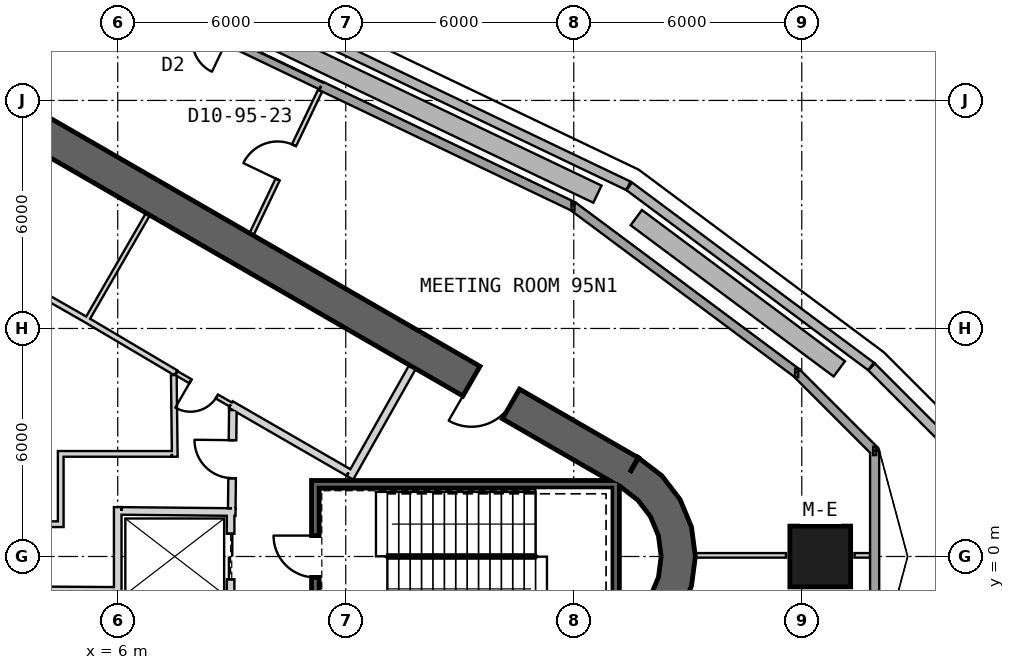
"""IFC4 building model, lengths in metres.
Left out: names, types, materials, properties, quantities, classifications, styles, units other than length and angle.
Written with IfcOpenShell. Run it as: python <this file> out.ifc"""

import sys

from ifc_helpers import new_model, si_unit, direction, frame, frame_2d, origin, origin_2d, place, context, subcontext, project, spatial, polyline, rectangle, outline, extrude, element, fill, save


model = new_model("IFC4")
c1 = context("Model", 3, precision=1e-05, world=origin(), true_north=direction((0.0, 1.0)))
c2 = subcontext(c1, "Body", "Model", "MODEL_VIEW")
j1 = project(units=[si_unit("LENGTHUNIT", "METRE"), si_unit("PLANEANGLEUNIT", "RADIAN")], contexts=[c1])
p1 = place(None, origin())
s1 = spatial("IfcSite", under=j1, at=p1, CompositionType="ELEMENT")
p2 = place(p1, origin())
s2 = spatial("IfcBuilding", under=s1, at=p2, CompositionType="ELEMENT")
p3 = place(p2, frame((0.0, 0.0, 420.3)))
s3 = spatial("IfcBuildingStorey", under=s2, at=p3, CompositionType="ELEMENT", Elevation=420.3)
p4 = place(p3, frame((24.486, 0.0, -0.25), z_axis=(0.0, 0.0, 1.0), x_axis=(1.0, 0.0, 0.0)))
e1 = element("IfcColumn", 1, at=p4, inside=s3, PredefinedType="COLUMN", context=c2, shape_type="SweptSolid", body=[
    extrude(rectangle(XDim=1.6, YDim=1.6, at=origin_2d()), origin(), (0.0, 0.0, 1.0), 5.0),
])
p5 = place(p3, frame((19.475, 2.208, 0.0), z_axis=(0.0, 0.0, 1.0), x_axis=(-0.866028369851, 0.499994862586, 0.0)))
e2 = element("IfcWall", 2, at=p5, inside=s3, PredefinedType="SHEAR", context=c2, shape_type="SweptSolid", body=[
    extrude(rectangle(XDim=31.523, YDim=0.9, at=frame_2d((15.762, 0.0))), origin(), (0.0, 0.0, 1.0), 5.0),
])
p6 = place(p5, frame((3.612, 0.0, 0.0)))
e3 = element("IfcOpeningElement", 3, at=p6, cuts=e2, PredefinedType="OPENING", context=c2, shape_type="SweptSolid", body=[
    extrude(rectangle(XDim=1.2, YDim=2.4, at=frame_2d((0.6, 1.2))), frame((0.0, 0.46, 0.0), z_axis=(0.0, -1.0, 0.0), x_axis=(1.0, 0.0, 0.0)), (0.0, 0.0, 1.0), 0.92),
])
p7 = place(p5, frame((26.712, 0.0, 0.0)))
e4 = element("IfcOpeningElement", 4, at=p7, cuts=e2, PredefinedType="OPENING", context=c2, shape_type="SweptSolid", body=[
    extrude(rectangle(XDim=1.2, YDim=2.4, at=frame_2d((0.6, 1.2))), frame((0.0, 0.46, 0.0), z_axis=(0.0, -1.0, 0.0), x_axis=(1.0, 0.0, 0.0)), (0.0, 0.0, 1.0), 0.92),
])
p8 = place(p3, origin())
e5 = element("IfcWall", 5, at=p8, inside=s3, PredefinedType="SHEAR", context=c2, shape_type="SweptSolid", body=[
    extrude(outline(polyline([(19.7, -2.598), (20.321, -2.121), (20.798, -1.5), (21.098, -0.777), (21.2, 0.0), (21.098, 0.777), (20.798, 1.5), (20.321, 2.121), (19.7, 2.598), (19.25, 1.819), (19.685, 1.485), (20.019, 1.05), (20.229, 0.543), (20.3, 0.0), (20.229, -0.543), (20.019, -1.05), (19.685, -1.485), (19.25, -1.819), (19.7, -2.598)])), origin(), (0.0, 0.0, 1.0), 5.0),
])
p9 = place(p3, frame((23.866, 4.83, 0.0), z_axis=(0.0, 0.0, 1.0), x_axis=(-0.801975305826, 0.597357186987, 0.0)))
e6 = element("IfcWall", 6, at=p9, inside=s3, PredefinedType="SOLIDWALL", context=c2, shape_type="SweptSolid", body=[
    extrude(rectangle(XDim=7.34, YDim=0.24, at=frame_2d((3.67, 0.0))), origin(), (0.0, 0.0, 1.0), 4.75),
])
p10 = place(p3, frame((17.98, 9.214, 0.0), z_axis=(0.0, 0.0, 1.0), x_axis=(-0.90231860982, 0.431069746528, 0.0)))
e7 = element("IfcWall", 7, at=p10, inside=s3, PredefinedType="SOLIDWALL", context=c2, shape_type="SweptSolid", body=[
    extrude(rectangle(XDim=7.346, YDim=0.24, at=frame_2d((3.673, 0.0))), origin(), (0.0, 0.0, 1.0), 4.75),
])
p11 = place(p3, frame((25.917, -2.779, 0.0), z_axis=(0.0, 0.0, 1.0), x_axis=(0.0, 1.0, 0.0)))
e8 = element("IfcWall", 8, at=p11, inside=s3, PredefinedType="SOLIDWALL", context=c2, shape_type="SweptSolid", body=[
    extrude(rectangle(XDim=5.558, YDim=0.24, at=frame_2d((2.779, 0.0))), origin(), (0.0, 0.0, 1.0), 4.75),
])
p12 = place(p3, frame((25.917, 2.779, 0.0), z_axis=(0.0, 0.0, 1.0), x_axis=(-0.707106781187, 0.707106781187, 0.0)))
e9 = element("IfcWall", 9, at=p12, inside=s3, PredefinedType="SOLIDWALL", context=c2, shape_type="SweptSolid", body=[
    extrude(rectangle(XDim=2.9, YDim=0.24, at=frame_2d((1.45, 0.0))), origin(), (0.0, 0.0, 1.0), 4.75),
])
p13 = place(p3, frame((11.351, 12.381, 0.0), z_axis=(0.0, 0.0, 1.0), x_axis=(-0.902328654497, 0.431048720301, 0.0)))
e10 = element("IfcWall", 10, at=p13, inside=s3, PredefinedType="SOLIDWALL", context=c2, shape_type="SweptSolid", body=[
    extrude(rectangle(XDim=7.306, YDim=0.2, at=frame_2d((3.653, 0.0))), origin(), (0.0, 0.0, 1.0), 4.75),
])
p14 = place(p13, frame((2.753, 0.0, 0.0)))
e11 = element("IfcOpeningElement", 11, at=p14, cuts=e10, PredefinedType="OPENING", context=c2, shape_type="SweptSolid", body=[
    extrude(rectangle(XDim=1.8, YDim=2.4, at=frame_2d((0.9, 1.2))), frame((0.0, 0.11, 0.0), z_axis=(0.0, -1.0, 0.0), x_axis=(1.0, 0.0, 0.0)), (0.0, 0.0, 1.0), 0.22),
])
p15 = place(p3, frame((25.836, 4.99, 0.04), z_axis=(0.0, 0.0, 1.0), x_axis=(0.707106781187, -0.707106781187, 0.0)))
e12 = element("IfcWall", 12, at=p15, inside=s3, PredefinedType="PARAPET", context=c2, shape_type="SweptSolid", body=[
    extrude(rectangle(XDim=3.0, YDim=0.25, at=frame_2d((1.5, 0.0))), origin(), (0.0, 0.0, 1.0), 1.2),
])
p16 = place(p3, frame((-2.224, 20.102, 0.04), z_axis=(0.0, 0.0, 1.0), x_axis=(0.902316737592, -0.43107366547, 0.0)))
e13 = element("IfcWall", 13, at=p16, inside=s3, PredefinedType="PARAPET", context=c2, shape_type="SweptSolid", body=[
    extrude(rectangle(XDim=24.007, YDim=0.25, at=frame_2d((12.004, 0.0))), origin(), (0.0, 0.0, 1.0), 1.2),
])
p17 = place(p3, frame((19.459, 9.741, 0.04), z_axis=(0.0, 0.0, 1.0), x_axis=(0.801989479124, -0.597338158311, 0.0)))
e14 = element("IfcWall", 14, at=p17, inside=s3, PredefinedType="PARAPET", context=c2, shape_type="SweptSolid", body=[
    extrude(rectangle(XDim=7.934, YDim=0.25, at=frame_2d((3.967, 0.0))), origin(), (0.0, 0.0, 1.0), 1.2),
])
p18 = place(p3, frame((-1.979, 19.376, 0.04), z_axis=(0.0, 0.0, 1.0), x_axis=(0.902317634008, -0.431071789101, 0.0)))
e15 = element("IfcWall", 15, at=p18, inside=s3, PredefinedType="PARAPET", context=c2, shape_type="SweptSolid", body=[
    extrude(rectangle(XDim=22.832, YDim=0.5, at=frame_2d((11.416, 0.0))), origin(), (0.0, 0.0, 1.0), 0.6),
])
p19 = place(p3, frame((19.645, 8.917, 0.04), z_axis=(0.0, 0.0, 1.0), x_axis=(0.801983344153, -0.597346395069, 0.0)))
e16 = element("IfcWall", 16, at=p19, inside=s3, PredefinedType="PARAPET", context=c2, shape_type="SweptSolid", body=[
    extrude(rectangle(XDim=6.662, YDim=0.5, at=frame_2d((3.331, 0.0))), origin(), (0.0, 0.0, 1.0), 0.6),
])
p20 = place(p3, frame((19.2, 1.9, -0.25), z_axis=(0.0, 0.0, 1.0), x_axis=(-1.0, 0.0, 0.0)))
e17 = element("IfcWall", 17, at=p20, inside=s3, PredefinedType="SHEAR", context=c2, shape_type="SweptSolid", body=[
    extrude(rectangle(XDim=8.1, YDim=0.2, at=frame_2d((4.05, 0.0))), origin(), (0.0, 0.0, 1.0), 5.0),
])
p21 = place(p3, frame((19.1, -2.0, -0.25), z_axis=(0.0, 0.0, 1.0), x_axis=(0.0, 1.0, 0.0)))
e18 = element("IfcWall", 18, at=p21, inside=s3, PredefinedType="SHEAR", context=c2, shape_type="SweptSolid", body=[
    extrude(rectangle(XDim=3.8, YDim=0.2, at=frame_2d((1.9, 0.0))), origin(), (0.0, 0.0, 1.0), 5.0),
])
p22 = place(p3, frame((11.2, -1.8, -0.25), z_axis=(0.0, 0.0, 1.0), x_axis=(0.0, 1.0, 0.0)))
e19 = element("IfcWall", 19, at=p22, inside=s3, PredefinedType="SHEAR", context=c2, shape_type="SweptSolid", body=[
    extrude(rectangle(XDim=3.6, YDim=0.2, at=frame_2d((1.8, 0.0))), origin(), (0.0, 0.0, 1.0), 5.0),
])
p23 = place(p22, frame((1.25, 0.0, 0.25)))
e20 = element("IfcOpeningElement", 20, at=p23, cuts=e19, PredefinedType="OPENING", context=c2, shape_type="SweptSolid", body=[
    extrude(rectangle(XDim=1.1, YDim=2.1, at=frame_2d((0.55, 1.05))), frame((0.0, 0.11, 0.0), z_axis=(0.0, -1.0, 0.0), x_axis=(1.0, 0.0, 0.0)), (0.0, 0.0, 1.0), 0.22),
])
p24 = place(p3, frame((8.97, 1.2, 0.0), z_axis=(0.0, 0.0, 1.0), x_axis=(0.0, -1.0, 0.0)))
e21 = element("IfcWall", 21, at=p24, inside=s3, PredefinedType="PLUMBINGWALL", context=c2, shape_type="SweptSolid", body=[
    extrude(rectangle(XDim=2.4, YDim=0.2, at=frame_2d((1.2, 0.0))), origin(), (0.0, 0.0, 1.0), 4.75),
])
p25 = place(p24, frame((0.6, 0.0, 0.0)))
e22 = element("IfcOpeningElement", 22, at=p25, cuts=e21, PredefinedType="OPENING", context=c2, shape_type="SweptSolid", body=[
    extrude(rectangle(XDim=1.2, YDim=2.4, at=frame_2d((0.6, 1.2))), frame((0.0, 0.11, 0.0), z_axis=(0.0, -1.0, 0.0), x_axis=(1.0, 0.0, 0.0)), (0.0, 0.0, 1.0), 0.22),
])
p26 = place(p3, frame((6.0, -1.1, 0.0), z_axis=(0.0, 0.0, 1.0), x_axis=(0.0, 1.0, 0.0)))
e23 = element("IfcWall", 23, at=p26, inside=s3, PredefinedType="PLUMBINGWALL", context=c2, shape_type="SweptSolid", body=[
    extrude(rectangle(XDim=2.4, YDim=0.2, at=frame_2d((1.2, 0.0))), origin(), (0.0, 0.0, 1.0), 4.75),
])
p27 = place(p3, frame((9.1, 1.169, 0.0), z_axis=(0.0, 0.0, 1.0), x_axis=(-0.99994990606, 0.010009264196, 0.0)))
e24 = element("IfcWall", 24, at=p27, inside=s3, PredefinedType="PLUMBINGWALL", context=c2, shape_type="SweptSolid", body=[
    extrude(rectangle(XDim=3.0, YDim=0.2, at=frame_2d((1.5, 0.0))), origin(), (0.0, 0.0, 1.0), 4.75),
])
p28 = place(p3, frame((6.795, 9.01, 0.0), z_axis=(0.0, 0.0, 1.0), x_axis=(-0.499984717929, -0.866034226713, 0.0)))
e25 = element("IfcWall", 25, at=p28, inside=s3, PredefinedType="PARTITIONING", context=c2, shape_type="SweptSolid", body=[
    extrude(rectangle(XDim=3.25, YDim=0.12, at=frame_2d((1.625, 0.0))), origin(), (0.0, 0.0, 1.0), 4.75),
])
p29 = place(p3, frame((12.11, 2.073, 0.0), z_axis=(0.0, 0.0, 1.0), x_axis=(0.49196600604, 0.870614408852, 0.0)))
e26 = element("IfcWall", 26, at=p29, inside=s3, PredefinedType="PARTITIONING", context=c2, shape_type="SweptSolid", body=[
    extrude(rectangle(XDim=3.35, YDim=0.2, at=frame_2d((1.675, 0.0))), origin(), (0.0, 0.0, 1.0), 4.75),
])
p30 = place(p3, frame((8.974, 3.999, 0.0), z_axis=(0.0, 0.0, 1.0), x_axis=(0.86601284211, -0.500021756827, 0.0)))
e27 = element("IfcWall", 27, at=p30, inside=s3, PredefinedType="PARTITIONING", context=c2, shape_type="SweptSolid", body=[
    extrude(rectangle(XDim=3.577, YDim=0.2, at=frame_2d((1.789, 0.0))), origin(), (0.0, 0.0, 1.0), 4.75),
])
p31 = place(p3, frame((7.53, 4.833, 0.0), z_axis=(0.0, 0.0, 1.0), x_axis=(-0.860550523279, 0.509365091938, 0.0)))
e28 = element("IfcWall", 28, at=p31, inside=s3, PredefinedType="PLUMBINGWALL", context=c2, shape_type="SweptSolid", body=[
    extrude(rectangle(XDim=2.755, YDim=0.15, at=frame_2d((1.377, 0.0))), origin(), (0.0, 0.0, 1.0), 4.75),
])
p32 = place(p3, frame((7.55, 4.821, 0.0), z_axis=(0.0, 0.0, 1.0), x_axis=(0.866069384335, -0.499923815713, 0.0)))
e29 = element("IfcWall", 29, at=p32, inside=s3, PredefinedType="PARTITIONING", context=c2, shape_type="SweptSolid", body=[
    extrude(rectangle(XDim=1.644, YDim=0.12, at=frame_2d((0.822, 0.0))), origin(), (0.0, 0.0, 1.0), 4.75),
])
p33 = place(p32, frame((0.422, 0.0, 0.0)))
e30 = element("IfcOpeningElement", 30, at=p33, cuts=e29, PredefinedType="OPENING", context=c2, shape_type="SweptSolid", body=[
    extrude(rectangle(XDim=0.8, YDim=2.1, at=frame_2d((0.4, 1.05))), frame((0.0, 0.07, 0.0), z_axis=(0.0, -1.0, 0.0), x_axis=(1.0, 0.0, 0.0)), (0.0, 0.0, 1.0), 0.14),
])
p34 = place(p3, frame((5.159, 6.236, 0.0), z_axis=(0.0, 0.0, 1.0), x_axis=(-0.868754934783, 0.495242226886, 0.0)))
e31 = element("IfcWall", 31, at=p34, inside=s3, PredefinedType="PLUMBINGWALL", context=c2, shape_type="SweptSolid", body=[
    extrude(rectangle(XDim=5.455, YDim=0.15, at=frame_2d((2.728, 0.0))), origin(), (0.0, 0.0, 1.0), 4.75),
])
p35 = place(p3, frame((9.001, 1.27, 0.0), z_axis=(0.0, 0.0, 1.0), x_axis=(0.010780534828, 0.999941888346, 0.0)))
e32 = element("IfcWall", 32, at=p35, inside=s3, PredefinedType="PARTITIONING", context=c2, shape_type="SweptSolid", body=[
    extrude(rectangle(XDim=2.582, YDim=0.2, at=frame_2d((1.291, 0.0))), origin(), (0.0, 0.0, 1.0), 4.75),
])
p36 = place(p35, frame((0.791, 0.0, 0.0)))
e33 = element("IfcOpeningElement", 33, at=p36, cuts=e32, PredefinedType="OPENING", context=c2, shape_type="SweptSolid", body=[
    extrude(rectangle(XDim=1.0, YDim=2.1, at=frame_2d((0.5, 1.05))), frame((0.0, 0.11, 0.0), z_axis=(0.0, -1.0, 0.0), x_axis=(1.0, 0.0, 0.0)), (0.0, 0.0, 1.0), 0.22),
])
p37 = place(p3, frame((5.9, -0.879, 0.0), z_axis=(0.0, 0.0, 1.0), x_axis=(-0.999978605844, 0.006541242613, 0.0)))
e34 = element("IfcWall", 34, at=p37, inside=s3, PredefinedType="PLUMBINGWALL", context=c2, shape_type="SweptSolid", body=[
    extrude(rectangle(XDim=4.404, YDim=0.15, at=frame_2d((2.202, 0.0))), origin(), (0.0, 0.0, 1.0), 4.75),
])
p38 = place(p37, frame((1.802, 0.0, 0.0)))
e35 = element("IfcOpeningElement", 35, at=p38, cuts=e34, PredefinedType="OPENING", context=c2, shape_type="SweptSolid", body=[
    extrude(rectangle(XDim=0.8, YDim=2.1, at=frame_2d((0.4, 1.05))), frame((0.0, 0.085, 0.0), z_axis=(0.0, -1.0, 0.0), x_axis=(1.0, 0.0, 0.0)), (0.0, 0.0, 1.0), 0.17),
])
p39 = place(p3, frame((7.501, 2.625, 0.0), z_axis=(0.0, 0.0, 1.0), x_axis=(-0.011799927307, 0.999930378434, 0.0)))
e36 = element("IfcWall", 36, at=p39, inside=s3, PredefinedType="PLUMBINGWALL", context=c2, shape_type="SweptSolid", body=[
    extrude(rectangle(XDim=2.152, YDim=0.15, at=frame_2d((1.076, 0.0))), origin(), (0.0, 0.0, 1.0), 4.75),
])
p40 = place(p3, frame((4.425, 2.7, 0.0), z_axis=(0.0, 0.0, 1.0), x_axis=(1.0, 0.0, 0.0)))
e37 = element("IfcWall", 37, at=p40, inside=s3, PredefinedType="PLUMBINGWALL", context=c2, shape_type="SweptSolid", body=[
    extrude(rectangle(XDim=3.0, YDim=0.15, at=frame_2d((1.5, 0.0))), origin(), (0.0, 0.0, 1.0), 4.75),
])
p41 = place(p3, frame((4.5, 0.775, 0.0), z_axis=(0.0, 0.0, 1.0), x_axis=(0.0, 1.0, 0.0)))
e38 = element("IfcWall", 38, at=p41, inside=s3, PredefinedType="PLUMBINGWALL", context=c2, shape_type="SweptSolid", body=[
    extrude(rectangle(XDim=1.85, YDim=0.15, at=frame_2d((0.925, 0.0))), origin(), (0.0, 0.0, 1.0), 4.75),
])
p42 = place(p3, frame((1.342, 0.85, 0.0), z_axis=(0.0, 0.0, 1.0), x_axis=(1.0, 0.0, 0.0)))
e39 = element("IfcWall", 39, at=p42, inside=s3, PredefinedType="PLUMBINGWALL", context=c2, shape_type="SweptSolid", body=[
    extrude(rectangle(XDim=3.083, YDim=0.15, at=frame_2d((1.542, 0.0))), origin(), (0.0, 0.0, 1.0), 4.75),
])
p43 = place(p3, frame((9.519, 8.476, 0.0), z_axis=(0.0, 0.0, 1.0), x_axis=(0.431123386303, 0.902292982231, 0.0)))
e40 = element("IfcWall", 40, at=p43, inside=s3, PredefinedType="PARTITIONING", context=c2, shape_type="SweptSolid", body=[
    extrude(rectangle(XDim=4.188, YDim=0.12, at=frame_2d((2.094, 0.0))), origin(), (0.0, 0.0, 1.0), 4.75),
])
p44 = place(p43, frame((1.6, 0.0, 0.0)))
e41 = element("IfcOpeningElement", 41, at=p44, cuts=e40, PredefinedType="OPENING", context=c2, shape_type="SweptSolid", body=[
    extrude(rectangle(XDim=1.0, YDim=2.1, at=frame_2d((0.5, 1.05))), frame((0.0, 0.07, 0.0), z_axis=(0.0, -1.0, 0.0), x_axis=(1.0, 0.0, 0.0)), (0.0, 0.0, 1.0), 0.14),
])
p45 = place(p3, frame((23.586, 0.03, 0.0), z_axis=(0.0, 0.0, 1.0), x_axis=(-1.0, 0.0, 0.0)))
e42 = element("IfcWall", 42, at=p45, inside=s3, PredefinedType="PARTITIONING", context=c2, shape_type="SweptSolid", body=[
    extrude(rectangle(XDim=2.54, YDim=0.12, at=frame_2d((1.27, 0.0))), origin(), (0.0, 0.0, 1.0), 2.52),
])
p46 = place(p3, frame((25.797, 0.03, 0.0), z_axis=(0.0, 0.0, 1.0), x_axis=(-1.0, 0.0, 0.0)))
e43 = element("IfcWall", 43, at=p46, inside=s3, PredefinedType="PARTITIONING", context=c2, shape_type="SweptSolid", body=[
    extrude(rectangle(XDim=0.411, YDim=0.12, at=frame_2d((0.206, 0.0))), origin(), (0.0, 0.0, 1.0), 4.75),
])
p47 = place(p23, origin())
e44 = element("IfcDoor", 44, at=p47, inside=s3, OperationType="SINGLE_SWING_RIGHT", PredefinedType="USERDEFINED", context=c2, shape_type="SweptSolid", body=[
    extrude(rectangle(XDim=1.1, YDim=2.1, at=frame_2d((0.55, 1.05))), frame((0.0, 0.025, 0.0), z_axis=(0.0, -1.0, 0.0), x_axis=(1.0, 0.0, 0.0)), (0.0, 0.0, 1.0), 0.05),
])
fill(e20, e44)
p48 = place(p36, origin())
e45 = element("IfcDoor", 45, at=p48, inside=s3, OperationType="SINGLE_SWING_RIGHT", PredefinedType="USERDEFINED", context=c2, shape_type="SweptSolid", body=[
    extrude(rectangle(XDim=1.0, YDim=2.1, at=frame_2d((0.5, 1.05))), frame((0.0, 0.025, 0.0), z_axis=(0.0, -1.0, 0.0), x_axis=(1.0, 0.0, 0.0)), (0.0, 0.0, 1.0), 0.05),
])
fill(e33, e45)
p49 = place(p25, origin())
e46 = element("IfcDoor", 46, at=p49, inside=s3, OperationType="SLIDING_TO_LEFT", PredefinedType="USERDEFINED", context=c2, shape_type="SweptSolid", body=[
    extrude(rectangle(XDim=1.2, YDim=2.4, at=frame_2d((0.6, 1.2))), frame((0.0, 0.025, 0.0), z_axis=(0.0, -1.0, 0.0), x_axis=(1.0, 0.0, 0.0)), (0.0, 0.0, 1.0), 0.05),
])
fill(e22, e46)
p50 = place(p33, origin())
e47 = element("IfcDoor", 47, at=p50, inside=s3, OperationType="SINGLE_SWING_LEFT", PredefinedType="USERDEFINED", context=c2, shape_type="SweptSolid", body=[
    extrude(rectangle(XDim=0.8, YDim=2.1, at=frame_2d((0.4, 1.05))), frame((0.0, 0.025, 0.0), z_axis=(0.0, -1.0, 0.0), x_axis=(1.0, 0.0, 0.0)), (0.0, 0.0, 1.0), 0.05),
])
fill(e30, e47)
p51 = place(p44, origin())
e48 = element("IfcDoor", 48, at=p51, inside=s3, OperationType="SINGLE_SWING_LEFT", PredefinedType="NOTDEFINED", context=c2, shape_type="SweptSolid", body=[
    extrude(rectangle(XDim=1.0, YDim=2.1, at=frame_2d((0.5, 1.05))), frame((0.0, 0.025, 0.0), z_axis=(0.0, -1.0, 0.0), x_axis=(1.0, 0.0, 0.0)), (0.0, 0.0, 1.0), 0.05),
])
fill(e41, e48)
p52 = place(p6, origin())
e49 = element("IfcDoor", 49, at=p52, inside=s3, OperationType="SINGLE_SWING_RIGHT", PredefinedType="USERDEFINED", context=c2, shape_type="SweptSolid", body=[
    extrude(rectangle(XDim=1.2, YDim=2.4, at=frame_2d((0.6, 1.2))), frame((0.0, 0.025, 0.0), z_axis=(0.0, -1.0, 0.0), x_axis=(1.0, 0.0, 0.0)), (0.0, 0.0, 1.0), 0.05),
])
fill(e3, e49)
save(model, sys.argv[1])
